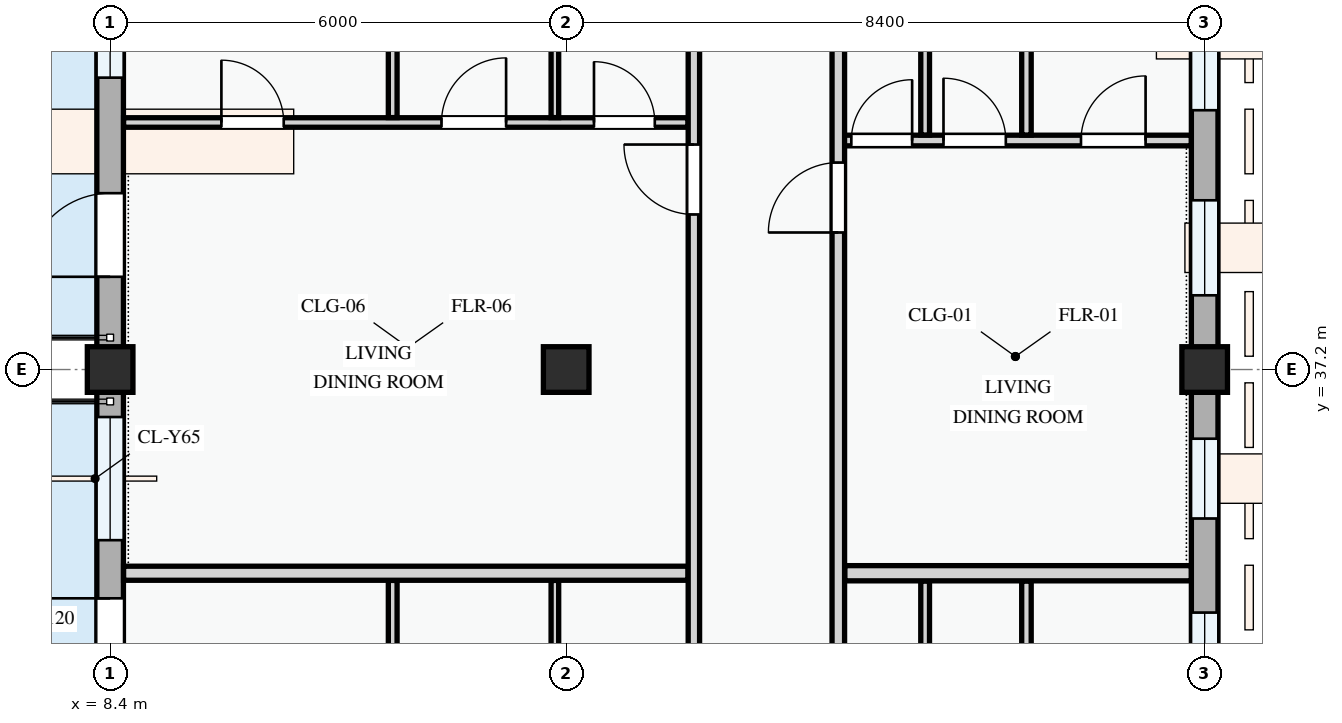
"""IFC4 building model, lengths in metres.
Left out: names, types, materials, properties, quantities, classifications, styles, units other than length and angle.
Written with IfcOpenShell. Run it as: python <this file> out.ifc"""

import sys

from ifc_helpers import new_model, si_unit, direction, frame, frame_2d, origin, origin_2d, place, context, subcontext, project, spatial, rectangle, extrude, element, fill, save


model = new_model("IFC4")
c1 = context("Model", 3, precision=1e-05, world=origin(), true_north=direction((0.0, 1.0)))
c2 = subcontext(c1, "Body", "Model", "MODEL_VIEW")
j1 = project(units=[si_unit("LENGTHUNIT", "METRE"), si_unit("PLANEANGLEUNIT", "RADIAN")], contexts=[c1])
p1 = place(None, origin())
s1 = spatial("IfcSite", under=j1, at=p1, CompositionType="ELEMENT")
p2 = place(p1, origin())
s2 = spatial("IfcBuilding", under=s1, at=p2, CompositionType="ELEMENT")
p3 = place(p2, frame((0.0, 0.0, 8.1)))
s3 = spatial("IfcBuildingStorey", under=s2, at=p3, CompositionType="ELEMENT", Elevation=8.1)
for number, where, z_axis, x_axis in (
    (1, (8.4, 37.2, 0.0), (0.0, 0.0, 1.0), (1.0, 0.0, 0.0)),
    (2, (14.4, 37.2, 0.0), (0.0, 0.0, 1.0), (1.0, 0.0, 0.0)),
    (3, (22.8, 37.2, 0.0), (0.0, 0.0, 1.0), (1.0, 0.0, 0.0)),
):
    element("IfcColumn", number, at=place(p3, frame(where, z_axis=z_axis, x_axis=x_axis)), inside=s3, PredefinedType="COLUMN", context=c2, shape_type="SweptSolid", body=[
        extrude(rectangle(XDim=0.6, YDim=0.6, at=origin_2d()), origin(), (0.0, 0.0, 1.0), 3.3),
    ])
p4 = place(p3, frame((22.8, 28.8, 0.0), z_axis=(0.0, 0.0, 1.0), x_axis=(0.0, 1.0, 0.0)))
e4 = element("IfcWall", 4, at=p4, inside=s3, PredefinedType="STANDARD", context=c2, shape_type="SweptSolid", body=[
    extrude(rectangle(XDim=8.4, YDim=0.35, at=frame_2d((4.2, 0.0))), origin(), (0.0, 0.0, 1.0), 2.425),
])
p5 = place(p4, frame((1.008, 0.0, 0.78)))
e5 = element("IfcOpeningElement", 5, at=p5, cuts=e4, PredefinedType="OPENING", context=c2, shape_type="SweptSolid", body=[
    extrude(rectangle(XDim=1.2, YDim=1.5, at=frame_2d((0.6, 0.75))), frame((0.0, 0.185, 0.0), z_axis=(0.0, -1.0, 0.0), x_axis=(1.0, 0.0, 0.0)), (0.0, 0.0, 1.0), 0.37),
])
p6 = place(p4, frame((3.403, 0.0, 0.78)))
e6 = element("IfcOpeningElement", 6, at=p6, cuts=e4, PredefinedType="OPENING", context=c2, shape_type="SweptSolid", body=[
    extrude(rectangle(XDim=1.8, YDim=1.5, at=frame_2d((0.9, 0.75))), frame((0.0, 0.185, 0.0), z_axis=(0.0, -1.0, 0.0), x_axis=(1.0, 0.0, 0.0)), (0.0, 0.0, 1.0), 0.37),
])
p7 = place(p4, frame((6.44, 0.0, 0.78)))
e7 = element("IfcOpeningElement", 7, at=p7, cuts=e4, PredefinedType="OPENING", context=c2, shape_type="SweptSolid", body=[
    extrude(rectangle(XDim=1.05, YDim=1.2, at=frame_2d((0.525, 0.6))), frame((0.0, 0.185, 0.0), z_axis=(0.0, -1.0, 0.0), x_axis=(1.0, 0.0, 0.0)), (0.0, 0.0, 1.0), 0.37),
])
p8 = place(p3, frame((22.8, 37.2, 0.0), z_axis=(0.0, 0.0, 1.0), x_axis=(0.0, 1.0, 0.0)))
e8 = element("IfcWall", 8, at=p8, inside=s3, PredefinedType="STANDARD", context=c2, shape_type="SweptSolid", body=[
    extrude(rectangle(XDim=6.0, YDim=0.35, at=frame_2d((3.0, 0.0))), origin(), (0.0, 0.0, 1.0), 2.575),
])
p9 = place(p8, frame((0.976, 0.0, 0.78)))
e9 = element("IfcOpeningElement", 9, at=p9, cuts=e8, PredefinedType="OPENING", context=c2, shape_type="SweptSolid", body=[
    extrude(rectangle(XDim=1.25, YDim=1.3, at=frame_2d((0.625, 0.65))), frame((0.0, 0.185, 0.0), z_axis=(0.0, -1.0, 0.0), x_axis=(1.0, 0.0, 0.0)), (0.0, 0.0, 1.0), 0.37),
])
p10 = place(p8, frame((3.411, 0.0, 0.78)))
e10 = element("IfcOpeningElement", 10, at=p10, cuts=e8, PredefinedType="OPENING", context=c2, shape_type="SweptSolid", body=[
    extrude(rectangle(XDim=2.0, YDim=1.5, at=frame_2d((1.0, 0.75))), frame((0.0, 0.185, 0.0), z_axis=(0.0, -1.0, 0.0), x_axis=(1.0, 0.0, 0.0)), (0.0, 0.0, 1.0), 0.37),
])
p11 = place(p3, frame((8.4, 43.2, 0.0), z_axis=(0.0, 0.0, 1.0), x_axis=(0.0, -1.0, 0.0)))
e11 = element("IfcWall", 11, at=p11, inside=s3, PredefinedType="STANDARD", context=c2, shape_type="SweptSolid", body=[
    extrude(rectangle(XDim=6.0, YDim=0.35, at=frame_2d((3.0, 0.0))), origin(), (0.0, 0.0, 1.0), 2.445),
])
p12 = place(p11, frame((3.68, 0.0, 0.0)))
e12 = element("IfcOpeningElement", 12, at=p12, cuts=e11, PredefinedType="OPENING", context=c2, shape_type="SweptSolid", body=[
    extrude(rectangle(XDim=1.1, YDim=2.15, at=frame_2d((0.55, 1.075))), frame((0.0, 0.185, 0.0), z_axis=(0.0, -1.0, 0.0), x_axis=(1.0, 0.0, 0.0)), (0.0, 0.0, 1.0), 0.37),
])
p13 = place(p11, frame((0.78, 0.0, 0.78)))
e13 = element("IfcOpeningElement", 13, at=p13, cuts=e11, PredefinedType="OPENING", context=c2, shape_type="SweptSolid", body=[
    extrude(rectangle(XDim=1.38, YDim=1.48, at=frame_2d((0.69, 0.74))), frame((0.0, 0.185, 0.0), z_axis=(0.0, -1.0, 0.0), x_axis=(1.0, 0.0, 0.0)), (0.0, 0.0, 1.0), 0.37),
])
p14 = place(p3, frame((8.4, 37.2, 0.0), z_axis=(0.0, 0.0, 1.0), x_axis=(0.0, -1.0, 0.0)))
e14 = element("IfcWall", 14, at=p14, inside=s3, PredefinedType="STANDARD", context=c2, shape_type="SweptSolid", body=[
    extrude(rectangle(XDim=8.4, YDim=0.35, at=frame_2d((4.2, 0.0))), origin(), (0.0, 0.0, 1.0), 2.345),
])
p15 = place(p14, frame((3.01, 0.0, 0.0)))
e15 = element("IfcOpeningElement", 15, at=p15, cuts=e14, PredefinedType="OPENING", context=c2, shape_type="SweptSolid", body=[
    extrude(rectangle(XDim=1.2, YDim=2.15, at=frame_2d((0.6, 1.075))), frame((0.0, 0.185, 0.0), z_axis=(0.0, -1.0, 0.0), x_axis=(1.0, 0.0, 0.0)), (0.0, 0.0, 1.0), 0.37),
])
p16 = place(p14, frame((0.625, 0.0, 0.78)))
e16 = element("IfcOpeningElement", 16, at=p16, cuts=e14, PredefinedType="OPENING", context=c2, shape_type="SweptSolid", body=[
    extrude(rectangle(XDim=1.62, YDim=1.38, at=frame_2d((0.81, 0.69))), frame((0.0, 0.185, 0.0), z_axis=(0.0, -1.0, 0.0), x_axis=(1.0, 0.0, 0.0)), (0.0, 0.0, 1.0), 0.37),
])
p17 = place(p14, frame((5.325, 0.0, 0.78)))
e17 = element("IfcOpeningElement", 17, at=p17, cuts=e14, PredefinedType="OPENING", context=c2, shape_type="SweptSolid", body=[
    extrude(rectangle(XDim=1.82, YDim=1.46, at=frame_2d((0.91, 0.73))), frame((0.0, 0.185, 0.0), z_axis=(0.0, -1.0, 0.0), x_axis=(1.0, 0.0, 0.0)), (0.0, 0.0, 1.0), 0.37),
])
p18 = place(p3, frame((12.118, 27.054, 0.0), z_axis=(0.0, 0.0, 1.0), x_axis=(0.0, 1.0, 0.0)))
e18 = element("IfcWall", 18, at=p18, inside=s3, PredefinedType="PARTITIONING", context=c2, shape_type="SweptSolid", body=[
    extrude(rectangle(XDim=7.371, YDim=0.115, at=frame_2d((3.686, 0.0))), origin(), (0.0, 0.0, 1.0), 3.0),
])
p19 = place(p3, frame((14.251, 27.054, 0.0), z_axis=(0.0, 0.0, 1.0), x_axis=(0.0, 1.0, 0.0)))
e19 = element("IfcWall", 19, at=p19, inside=s3, PredefinedType="PARTITIONING", context=c2, shape_type="SweptSolid", body=[
    extrude(rectangle(XDim=7.371, YDim=0.1, at=frame_2d((3.686, 0.0))), origin(), (0.0, 0.0, 1.0), 2.425),
])
p20 = place(p3, frame((20.455, 27.125, 0.0), z_axis=(0.0, 0.0, 1.0), x_axis=(0.0, 1.0, 0.0)))
e20 = element("IfcWall", 20, at=p20, inside=s3, PredefinedType="PARTITIONING", context=c2, shape_type="SweptSolid", body=[
    extrude(rectangle(XDim=7.293, YDim=0.125, at=frame_2d((3.646, 0.0))), origin(), (0.0, 0.0, 1.0), 3.0),
])
p21 = place(p3, frame((19.122, 27.125, 0.0), z_axis=(0.0, 0.0, 1.0), x_axis=(0.0, 1.0, 0.0)))
e21 = element("IfcWall", 21, at=p21, inside=s3, PredefinedType="PARTITIONING", context=c2, shape_type="SweptSolid", body=[
    extrude(rectangle(XDim=7.293, YDim=0.115, at=frame_2d((3.646, 0.0))), origin(), (0.0, 0.0, 1.0), 3.0),
])
p22 = place(p3, frame((8.577, 40.45, 0.0), z_axis=(0.0, 0.0, 1.0), x_axis=(1.0, 0.0, 0.0)))
e22 = element("IfcWall", 22, at=p22, inside=s3, PredefinedType="PARTITIONING", context=c2, shape_type="SweptSolid", body=[
    extrude(rectangle(XDim=7.426, YDim=0.125, at=frame_2d((3.713, 0.0))), origin(), (0.0, 0.0, 1.0), 3.0),
])
p23 = place(p22, frame((1.287, 0.0, 0.0)))
e23 = element("IfcOpeningElement", 23, at=p23, cuts=e22, PredefinedType="OPENING", context=c2, shape_type="SweptSolid", body=[
    extrude(rectangle(XDim=0.82, YDim=2.08, at=frame_2d((0.41, 1.04))), frame((0.0, 0.073, 0.0), z_axis=(0.0, -1.0, 0.0), x_axis=(1.0, 0.0, 0.0)), (0.0, 0.0, 1.0), 0.145),
])
p24 = place(p22, frame((4.182, 0.0, 0.0)))
e24 = element("IfcOpeningElement", 24, at=p24, cuts=e22, PredefinedType="OPENING", context=c2, shape_type="SweptSolid", body=[
    extrude(rectangle(XDim=0.85, YDim=2.1, at=frame_2d((0.425, 1.05))), frame((0.0, 0.073, 0.0), z_axis=(0.0, -1.0, 0.0), x_axis=(1.0, 0.0, 0.0)), (0.0, 0.0, 1.0), 0.145),
])
p25 = place(p22, frame((6.189, 0.0, 0.0)))
e25 = element("IfcOpeningElement", 25, at=p25, cuts=e22, PredefinedType="OPENING", context=c2, shape_type="SweptSolid", body=[
    extrude(rectangle(XDim=0.8, YDim=2.1, at=frame_2d((0.4, 1.05))), frame((0.0, 0.073, 0.0), z_axis=(0.0, -1.0, 0.0), x_axis=(1.0, 0.0, 0.0)), (0.0, 0.0, 1.0), 0.145),
])
p26 = place(p3, frame((12.118, 40.514, 0.0), z_axis=(0.0, 0.0, 1.0), x_axis=(0.0, 1.0, 0.0)))
e26 = element("IfcWall", 26, at=p26, inside=s3, PredefinedType="PARTITIONING", context=c2, shape_type="SweptSolid", body=[
    extrude(rectangle(XDim=5.754, YDim=0.115, at=frame_2d((2.877, 0.0))), origin(), (0.0, 0.0, 1.0), 3.0),
])
p27 = place(p3, frame((14.251, 40.514, 0.0), z_axis=(0.0, 0.0, 1.0), x_axis=(0.0, 1.0, 0.0)))
e27 = element("IfcWall", 27, at=p27, inside=s3, PredefinedType="PARTITIONING", context=c2, shape_type="SweptSolid", body=[
    extrude(rectangle(XDim=5.754, YDim=0.1, at=frame_2d((2.877, 0.0))), origin(), (0.0, 0.0, 1.0), 2.425),
])
p28 = place(p3, frame((17.98, 40.213, 0.0), z_axis=(0.0, 0.0, 1.0), x_axis=(1.0, 0.0, 0.0)))
e28 = element("IfcWall", 28, at=p28, inside=s3, PredefinedType="PARTITIONING", context=c2, shape_type="SweptSolid", body=[
    extrude(rectangle(XDim=4.643, YDim=0.14, at=frame_2d((2.322, 0.0))), origin(), (0.0, 0.0, 1.0), 3.0),
])
p29 = place(p28, frame((0.171, 0.0, 0.0)))
e29 = element("IfcOpeningElement", 29, at=p29, cuts=e28, PredefinedType="OPENING", context=c2, shape_type="SweptSolid", body=[
    extrude(rectangle(XDim=0.8, YDim=2.1, at=frame_2d((0.4, 1.05))), frame((0.0, 0.08, 0.0), z_axis=(0.0, -1.0, 0.0), x_axis=(1.0, 0.0, 0.0)), (0.0, 0.0, 1.0), 0.16),
])
p30 = place(p28, frame((1.384, 0.0, 0.0)))
e30 = element("IfcOpeningElement", 30, at=p30, cuts=e28, PredefinedType="OPENING", context=c2, shape_type="SweptSolid", body=[
    extrude(rectangle(XDim=0.82, YDim=2.08, at=frame_2d((0.41, 1.04))), frame((0.0, 0.08, 0.0), z_axis=(0.0, -1.0, 0.0), x_axis=(1.0, 0.0, 0.0)), (0.0, 0.0, 1.0), 0.16),
])
p31 = place(p28, frame((3.193, 0.0, 0.0)))
e31 = element("IfcOpeningElement", 31, at=p31, cuts=e28, PredefinedType="OPENING", context=c2, shape_type="SweptSolid", body=[
    extrude(rectangle(XDim=0.85, YDim=2.1, at=frame_2d((0.425, 1.05))), frame((0.0, 0.08, 0.0), z_axis=(0.0, -1.0, 0.0), x_axis=(1.0, 0.0, 0.0)), (0.0, 0.0, 1.0), 0.16),
])
p32 = place(p3, frame((20.455, 40.285, 0.0), z_axis=(0.0, 0.0, 1.0), x_axis=(0.0, 1.0, 0.0)))
e32 = element("IfcWall", 32, at=p32, inside=s3, PredefinedType="PARTITIONING", context=c2, shape_type="SweptSolid", body=[
    extrude(rectangle(XDim=6.0, YDim=0.125, at=frame_2d((3.0, 0.0))), origin(), (0.0, 0.0, 1.0), 3.0),
])
p33 = place(p3, frame((19.122, 40.285, 0.0), z_axis=(0.0, 0.0, 1.0), x_axis=(0.0, 1.0, 0.0)))
e33 = element("IfcWall", 33, at=p33, inside=s3, PredefinedType="PARTITIONING", context=c2, shape_type="SweptSolid", body=[
    extrude(rectangle(XDim=6.0, YDim=0.115, at=frame_2d((3.0, 0.0))), origin(), (0.0, 0.0, 1.0), 3.0),
])
p34 = place(p3, frame((8.577, 34.52, 0.0), z_axis=(0.0, 0.0, 1.0), x_axis=(1.0, 0.0, 0.0)))
e34 = element("IfcWall", 34, at=p34, inside=s3, PredefinedType="PARTITIONING", context=c2, shape_type="SweptSolid", body=[
    extrude(rectangle(XDim=7.426, YDim=0.185, at=frame_2d((3.713, 0.0))), origin(), (0.0, 0.0, 1.0), 3.0),
])
p35 = place(p3, frame((18.064, 34.52, 0.0), z_axis=(0.0, 0.0, 1.0), x_axis=(1.0, 0.0, 0.0)))
e35 = element("IfcWall", 35, at=p35, inside=s3, PredefinedType="PARTITIONING", context=c2, shape_type="SweptSolid", body=[
    extrude(rectangle(XDim=4.559, YDim=0.2, at=frame_2d((2.279, 0.0))), origin(), (0.0, 0.0, 1.0), 3.0),
])
p36 = place(p3, frame((16.08, 22.66, 0.0), z_axis=(0.0, 0.0, 1.0), x_axis=(0.0, 1.0, 0.0)))
e36 = element("IfcWall", 36, at=p36, inside=s3, PredefinedType="PARTITIONING", context=c2, shape_type="SweptSolid", body=[
    extrude(rectangle(XDim=34.763, YDim=0.15, at=frame_2d((17.382, 0.0))), origin(), (0.0, 0.0, 1.0), 3.0),
])
p37 = place(p36, frame((2.672, 0.0, 0.0)))
e37 = element("IfcOpeningElement", 37, at=p37, cuts=e36, PredefinedType="OPENING", context=c2, shape_type="SweptSolid", body=[
    extrude(rectangle(XDim=0.96, YDim=2.12, at=frame_2d((0.48, 1.06))), frame((0.0, 0.085, 0.0), z_axis=(0.0, -1.0, 0.0), x_axis=(1.0, 0.0, 0.0)), (0.0, 0.0, 1.0), 0.17),
])
p38 = place(p36, frame((16.58, 0.0, 0.0)))
e38 = element("IfcOpeningElement", 38, at=p38, cuts=e36, PredefinedType="OPENING", context=c2, shape_type="SweptSolid", body=[
    extrude(rectangle(XDim=0.92, YDim=2.1, at=frame_2d((0.46, 1.05))), frame((0.0, 0.085, 0.0), z_axis=(0.0, -1.0, 0.0), x_axis=(1.0, 0.0, 0.0)), (0.0, 0.0, 1.0), 0.17),
])
p39 = place(p36, frame((24.315, 0.0, 0.0)))
e39 = element("IfcOpeningElement", 39, at=p39, cuts=e36, PredefinedType="OPENING", context=c2, shape_type="SweptSolid", body=[
    extrude(rectangle(XDim=0.92, YDim=2.1, at=frame_2d((0.46, 1.05))), frame((0.0, 0.085, 0.0), z_axis=(0.0, -1.0, 0.0), x_axis=(1.0, 0.0, 0.0)), (0.0, 0.0, 1.0), 0.17),
])
p40 = place(p3, frame((17.98, 22.66, 0.0), z_axis=(0.0, 0.0, 1.0), x_axis=(0.0, 1.0, 0.0)))
e40 = element("IfcWall", 40, at=p40, inside=s3, PredefinedType="PARTITIONING", context=c2, shape_type="SweptSolid", body=[
    extrude(rectangle(XDim=34.763, YDim=0.165, at=frame_2d((17.382, 0.0))), origin(), (0.0, 0.0, 1.0), 3.0),
])
p41 = place(p40, frame((2.633, 0.0, 0.0)))
e41 = element("IfcOpeningElement", 41, at=p41, cuts=e40, PredefinedType="OPENING", context=c2, shape_type="SweptSolid", body=[
    extrude(rectangle(XDim=0.92, YDim=2.1, at=frame_2d((0.46, 1.05))), frame((0.0, 0.093, 0.0), z_axis=(0.0, -1.0, 0.0), x_axis=(1.0, 0.0, 0.0)), (0.0, 0.0, 1.0), 0.185),
])
p42 = place(p40, frame((16.343, 0.0, 0.0)))
e42 = element("IfcOpeningElement", 42, at=p42, cuts=e40, PredefinedType="OPENING", context=c2, shape_type="SweptSolid", body=[
    extrude(rectangle(XDim=0.92, YDim=2.1, at=frame_2d((0.46, 1.05))), frame((0.0, 0.093, 0.0), z_axis=(0.0, -1.0, 0.0), x_axis=(1.0, 0.0, 0.0)), (0.0, 0.0, 1.0), 0.185),
])
p43 = place(p40, frame((24.313, 0.0, 0.0)))
e43 = element("IfcOpeningElement", 43, at=p43, cuts=e40, PredefinedType="OPENING", context=c2, shape_type="SweptSolid", body=[
    extrude(rectangle(XDim=0.96, YDim=2.12, at=frame_2d((0.48, 1.06))), frame((0.0, 0.093, 0.0), z_axis=(0.0, -1.0, 0.0), x_axis=(1.0, 0.0, 0.0)), (0.0, 0.0, 1.0), 0.185),
])
p44 = place(p6, origin())
e44 = element("IfcWindow", 44, at=p44, inside=s3, PartitioningType="DOUBLE_PANEL_VERTICAL", PredefinedType="WINDOW", context=c2, shape_type="SweptSolid", body=[
    extrude(rectangle(XDim=1.8, YDim=1.5, at=frame_2d((0.9, 0.75))), frame((0.0, 0.03, 0.0), z_axis=(0.0, -1.0, 0.0), x_axis=(1.0, 0.0, 0.0)), (0.0, 0.0, 1.0), 0.06),
])
fill(e6, e44)
p45 = place(p7, origin())
e45 = element("IfcWindow", 45, at=p45, inside=s3, PartitioningType="SINGLE_PANEL", PredefinedType="WINDOW", context=c2, shape_type="SweptSolid", body=[
    extrude(rectangle(XDim=1.05, YDim=1.2, at=frame_2d((0.525, 0.6))), frame((0.0, 0.03, 0.0), z_axis=(0.0, -1.0, 0.0), x_axis=(1.0, 0.0, 0.0)), (0.0, 0.0, 1.0), 0.06),
])
fill(e7, e45)
p46 = place(p9, origin())
e46 = element("IfcWindow", 46, at=p46, inside=s3, PartitioningType="SINGLE_PANEL", PredefinedType="WINDOW", context=c2, shape_type="SweptSolid", body=[
    extrude(rectangle(XDim=1.25, YDim=1.3, at=frame_2d((0.625, 0.65))), frame((0.0, 0.03, 0.0), z_axis=(0.0, -1.0, 0.0), x_axis=(1.0, 0.0, 0.0)), (0.0, 0.0, 1.0), 0.06),
])
fill(e9, e46)
p47 = place(p10, origin())
e47 = element("IfcWindow", 47, at=p47, inside=s3, PartitioningType="DOUBLE_PANEL_VERTICAL", PredefinedType="WINDOW", context=c2, shape_type="SweptSolid", body=[
    extrude(rectangle(XDim=2.0, YDim=1.5, at=frame_2d((1.0, 0.75))), frame((0.0, 0.03, 0.0), z_axis=(0.0, -1.0, 0.0), x_axis=(1.0, 0.0, 0.0)), (0.0, 0.0, 1.0), 0.06),
])
fill(e10, e47)
p48 = place(p12, frame((1.1, 0.0, 0.0), z_axis=(0.0, 0.0, 1.0), x_axis=(-1.0, 0.0, 0.0)))
e48 = element("IfcDoor", 48, at=p48, inside=s3, OperationType="SINGLE_SWING_LEFT", PredefinedType="DOOR", context=c2, shape_type="SweptSolid", body=[
    extrude(rectangle(XDim=1.1, YDim=2.15, at=frame_2d((0.55, 1.075))), frame((0.0, 0.025, 0.0), z_axis=(0.0, -1.0, 0.0), x_axis=(1.0, 0.0, 0.0)), (0.0, 0.0, 1.0), 0.05),
])
fill(e12, e48)
p49 = place(p13, origin())
e49 = element("IfcWindow", 49, at=p49, inside=s3, PartitioningType="SINGLE_PANEL", PredefinedType="WINDOW", context=c2, shape_type="SweptSolid", body=[
    extrude(rectangle(XDim=1.38, YDim=1.48, at=frame_2d((0.69, 0.74))), frame((0.0, 0.03, 0.0), z_axis=(0.0, -1.0, 0.0), x_axis=(1.0, 0.0, 0.0)), (0.0, 0.0, 1.0), 0.06),
])
fill(e13, e49)
p50 = place(p15, frame((1.2, 0.0, 0.0), z_axis=(0.0, 0.0, 1.0), x_axis=(-1.0, 0.0, 0.0)))
e50 = element("IfcDoor", 50, at=p50, inside=s3, OperationType="SINGLE_SWING_RIGHT", PredefinedType="DOOR", context=c2, shape_type="SweptSolid", body=[
    extrude(rectangle(XDim=1.2, YDim=2.15, at=frame_2d((0.6, 1.075))), frame((0.0, 0.025, 0.0), z_axis=(0.0, -1.0, 0.0), x_axis=(1.0, 0.0, 0.0)), (0.0, 0.0, 1.0), 0.05),
])
fill(e15, e50)
p51 = place(p16, origin())
e51 = element("IfcWindow", 51, at=p51, inside=s3, PartitioningType="DOUBLE_PANEL_VERTICAL", PredefinedType="WINDOW", context=c2, shape_type="SweptSolid", body=[
    extrude(rectangle(XDim=1.62, YDim=1.38, at=frame_2d((0.81, 0.69))), frame((0.0, 0.03, 0.0), z_axis=(0.0, -1.0, 0.0), x_axis=(1.0, 0.0, 0.0)), (0.0, 0.0, 1.0), 0.06),
])
fill(e16, e51)
p52 = place(p23, origin())
e52 = element("IfcDoor", 52, at=p52, inside=s3, OperationType="SINGLE_SWING_LEFT", PredefinedType="DOOR", context=c2, shape_type="SweptSolid", body=[
    extrude(rectangle(XDim=0.82, YDim=2.08, at=frame_2d((0.41, 1.04))), frame((0.0, 0.025, 0.0), z_axis=(0.0, -1.0, 0.0), x_axis=(1.0, 0.0, 0.0)), (0.0, 0.0, 1.0), 0.05),
])
fill(e23, e52)
p53 = place(p24, origin())
e53 = element("IfcDoor", 53, at=p53, inside=s3, OperationType="SINGLE_SWING_RIGHT", PredefinedType="DOOR", context=c2, shape_type="SweptSolid", body=[
    extrude(rectangle(XDim=0.85, YDim=2.1, at=frame_2d((0.425, 1.05))), frame((0.0, 0.025, 0.0), z_axis=(0.0, -1.0, 0.0), x_axis=(1.0, 0.0, 0.0)), (0.0, 0.0, 1.0), 0.05),
])
fill(e24, e53)
p54 = place(p25, origin())
e54 = element("IfcDoor", 54, at=p54, inside=s3, OperationType="SINGLE_SWING_LEFT", PredefinedType="DOOR", context=c2, shape_type="SweptSolid", body=[
    extrude(rectangle(XDim=0.8, YDim=2.1, at=frame_2d((0.4, 1.05))), frame((0.0, 0.025, 0.0), z_axis=(0.0, -1.0, 0.0), x_axis=(1.0, 0.0, 0.0)), (0.0, 0.0, 1.0), 0.05),
])
fill(e25, e54)
p55 = place(p29, origin())
e55 = element("IfcDoor", 55, at=p55, inside=s3, OperationType="SINGLE_SWING_RIGHT", PredefinedType="DOOR", context=c2, shape_type="SweptSolid", body=[
    extrude(rectangle(XDim=0.8, YDim=2.1, at=frame_2d((0.4, 1.05))), frame((0.0, 0.025, 0.0), z_axis=(0.0, -1.0, 0.0), x_axis=(1.0, 0.0, 0.0)), (0.0, 0.0, 1.0), 0.05),
])
fill(e29, e55)
p56 = place(p30, origin())
e56 = element("IfcDoor", 56, at=p56, inside=s3, OperationType="SINGLE_SWING_LEFT", PredefinedType="DOOR", context=c2, shape_type="SweptSolid", body=[
    extrude(rectangle(XDim=0.82, YDim=2.08, at=frame_2d((0.41, 1.04))), frame((0.0, 0.025, 0.0), z_axis=(0.0, -1.0, 0.0), x_axis=(1.0, 0.0, 0.0)), (0.0, 0.0, 1.0), 0.05),
])
fill(e30, e56)
p57 = place(p31, origin())
e57 = element("IfcDoor", 57, at=p57, inside=s3, OperationType="SINGLE_SWING_RIGHT", PredefinedType="DOOR", context=c2, shape_type="SweptSolid", body=[
    extrude(rectangle(XDim=0.85, YDim=2.1, at=frame_2d((0.425, 1.05))), frame((0.0, 0.025, 0.0), z_axis=(0.0, -1.0, 0.0), x_axis=(1.0, 0.0, 0.0)), (0.0, 0.0, 1.0), 0.05),
])
fill(e31, e57)
p58 = place(p38, origin())
e58 = element("IfcDoor", 58, at=p58, inside=s3, OperationType="SINGLE_SWING_RIGHT", PredefinedType="DOOR", context=c2, shape_type="SweptSolid", body=[
    extrude(rectangle(XDim=0.92, YDim=2.1, at=frame_2d((0.46, 1.05))), frame((0.0, 0.025, 0.0), z_axis=(0.0, -1.0, 0.0), x_axis=(1.0, 0.0, 0.0)), (0.0, 0.0, 1.0), 0.05),
])
fill(e38, e58)
p59 = place(p42, origin())
e59 = element("IfcDoor", 59, at=p59, inside=s3, OperationType="SINGLE_SWING_LEFT", PredefinedType="DOOR", context=c2, shape_type="SweptSolid", body=[
    extrude(rectangle(XDim=0.92, YDim=2.1, at=frame_2d((0.46, 1.05))), frame((0.0, 0.025, 0.0), z_axis=(0.0, -1.0, 0.0), x_axis=(1.0, 0.0, 0.0)), (0.0, 0.0, 1.0), 0.05),
])
fill(e42, e59)
save(model, sys.argv[1])
